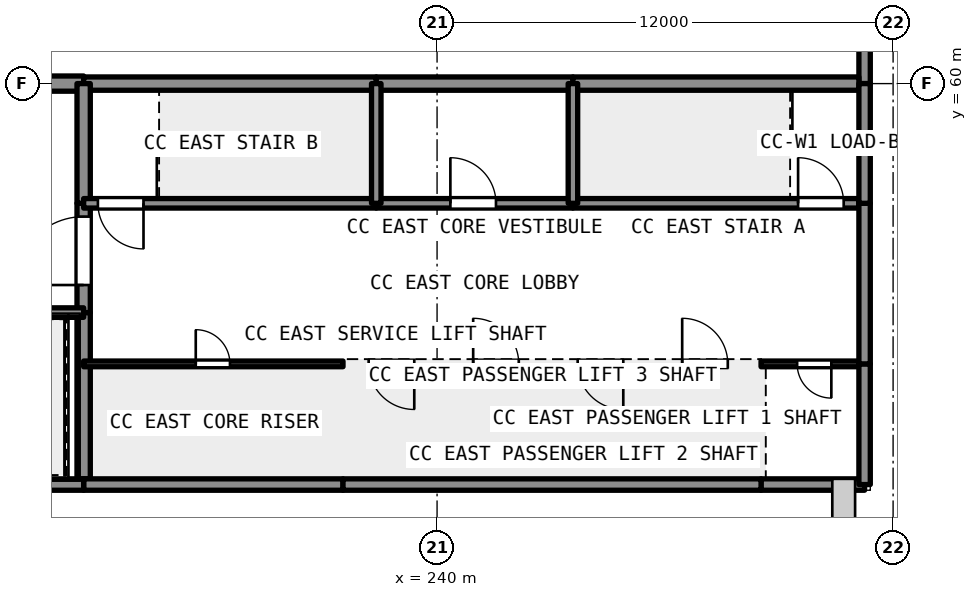
"""IFC4 building model, lengths in metres.
Left out: names, types, materials, properties, quantities, classifications, styles, units other than length and angle.
Written with IfcOpenShell. Run it as: python <this file> out.ifc"""

import sys

from ifc_helpers import new_model, si_unit, direction, frame, frame_2d, origin, place, context, subcontext, project, spatial, rectangle, extrude, element, fill, save


model = new_model("IFC4")
c1 = context("Model", 3, precision=1e-05, world=origin(), true_north=direction((0.0, 1.0)))
c2 = subcontext(c1, "Body", "Model", "MODEL_VIEW")
j1 = project(units=[si_unit("LENGTHUNIT", "METRE"), si_unit("PLANEANGLEUNIT", "RADIAN")], contexts=[c1])
p1 = place(None, origin())
s1 = spatial("IfcSite", under=j1, at=p1, CompositionType="ELEMENT")
p2 = place(p1, origin())
s2 = spatial("IfcBuilding", under=s1, at=p2, CompositionType="ELEMENT")
p3 = place(p2, frame((0.0, 0.0, 20.4)))
s3 = spatial("IfcBuildingStorey", under=s2, at=p3, CompositionType="ELEMENT", Elevation=20.4)
p4 = place(p3, frame((221.1, 60.0, 0.0), z_axis=(0.0, 0.0, 1.0), x_axis=(1.0, 0.0, 0.0)))
e1 = element("IfcWall", 1, at=p4, inside=s3, PredefinedType="SHEAR", context=c2, shape_type="SweptSolid", body=[
    extrude(rectangle(XDim=9.6, YDim=0.4, at=frame_2d((4.8, 0.0))), origin(), (0.0, 0.0, 1.0), 4.59),
])
p5 = place(p3, frame((251.25, 60.0, 0.0), z_axis=(0.0, 0.0, 1.0), x_axis=(0.0, 1.0, 0.0)))
e2 = element("IfcWall", 2, at=p5, inside=s3, PredefinedType="SOLIDWALL", context=c2, shape_type="SweptSolid", body=[
    extrude(rectangle(XDim=50.55, YDim=0.3, at=frame_2d((25.275, 0.0))), origin(), (0.0, 0.0, 1.0), 4.59),
])
p6 = place(p3, frame((230.7, 60.0, 0.0), z_axis=(0.0, 0.0, 1.0), x_axis=(1.0, 0.0, 0.0)))
e3 = element("IfcWall", 3, at=p6, inside=s3, PredefinedType="SHEAR", context=c2, shape_type="SweptSolid", body=[
    extrude(rectangle(XDim=7.7, YDim=0.35, at=frame_2d((3.85, 0.0))), origin(), (0.0, 0.0, 1.0), 4.59),
])
p7 = place(p3, frame((238.4, 60.0, 0.0), z_axis=(0.0, 0.0, 1.0), x_axis=(1.0, 0.0, 0.0)))
e4 = element("IfcWall", 4, at=p7, inside=s3, PredefinedType="SHEAR", context=c2, shape_type="SweptSolid", body=[
    extrude(rectangle(XDim=5.175, YDim=0.35, at=frame_2d((2.587, 0.0))), origin(), (0.0, 0.0, 1.0), 4.59),
])
p8 = place(p3, frame((243.575, 60.0, 0.0), z_axis=(0.0, 0.0, 1.0), x_axis=(1.0, 0.0, 0.0)))
e5 = element("IfcWall", 5, at=p8, inside=s3, PredefinedType="SHEAR", context=c2, shape_type="SweptSolid", body=[
    extrude(rectangle(XDim=7.525, YDim=0.35, at=frame_2d((3.763, 0.0))), origin(), (0.0, 0.0, 1.0), 4.59),
])
p9 = place(p3, frame((230.7, 49.6, 0.0), z_axis=(0.0, 0.0, 1.0), x_axis=(0.0, 1.0, 0.0)))
e6 = element("IfcWall", 6, at=p9, inside=s3, PredefinedType="SHEAR", context=c2, shape_type="SweptSolid", body=[
    extrude(rectangle(XDim=4.375, YDim=0.35, at=frame_2d((2.188, 0.0))), origin(), (0.0, 0.0, 1.0), 4.59),
])
p10 = place(p3, frame((230.7, 53.975, 0.0), z_axis=(0.0, 0.0, 1.0), x_axis=(0.0, 1.0, 0.0)))
e7 = element("IfcWall", 7, at=p10, inside=s3, PredefinedType="SHEAR", context=c2, shape_type="SweptSolid", body=[
    extrude(rectangle(XDim=2.875, YDim=0.35, at=frame_2d((1.438, 0.0))), origin(), (0.0, 0.0, 1.0), 4.59),
])
p11 = place(p10, frame((0.725, 0.0, 0.0)))
e8 = element("IfcOpeningElement", 8, at=p11, cuts=e7, PredefinedType="OPENING", context=c2, shape_type="SweptSolid", body=[
    extrude(rectangle(XDim=1.8, YDim=2.1, at=frame_2d((0.9, 1.05))), frame((0.0, 0.186, 0.0), z_axis=(0.0, -1.0, 0.0), x_axis=(1.0, 0.0, 0.0)), (0.0, 0.0, 1.0), 0.371),
])
p12 = place(p3, frame((230.7, 56.85, 0.0), z_axis=(0.0, 0.0, 1.0), x_axis=(0.0, 1.0, 0.0)))
e9 = element("IfcWall", 9, at=p12, inside=s3, PredefinedType="SHEAR", context=c2, shape_type="SweptSolid", body=[
    extrude(rectangle(XDim=3.15, YDim=0.35, at=frame_2d((1.575, 0.0))), origin(), (0.0, 0.0, 1.0), 4.59),
])
p13 = place(p3, frame((238.4, 56.85, 0.0), z_axis=(0.0, 0.0, 1.0), x_axis=(-1.0, 0.0, 0.0)))
e10 = element("IfcWall", 10, at=p13, inside=s3, PredefinedType="SHEAR", context=c2, shape_type="SweptSolid", body=[
    extrude(rectangle(XDim=7.7, YDim=0.25, at=frame_2d((3.85, 0.0))), origin(), (0.0, 0.0, 1.0), 4.59),
])
p14 = place(p13, frame((6.125, 0.0, 0.0)))
e11 = element("IfcOpeningElement", 11, at=p14, cuts=e10, PredefinedType="OPENING", context=c2, shape_type="SweptSolid", body=[
    extrude(rectangle(XDim=1.2, YDim=2.1, at=frame_2d((0.6, 1.05))), frame((0.0, 0.135, 0.0), z_axis=(0.0, -1.0, 0.0), x_axis=(1.0, 0.0, 0.0)), (0.0, 0.0, 1.0), 0.271),
])
p15 = place(p3, frame((243.575, 56.85, 0.0), z_axis=(0.0, 0.0, 1.0), x_axis=(-1.0, 0.0, 0.0)))
e12 = element("IfcWall", 12, at=p15, inside=s3, PredefinedType="SHEAR", context=c2, shape_type="SweptSolid", body=[
    extrude(rectangle(XDim=5.175, YDim=0.25, at=frame_2d((2.587, 0.0))), origin(), (0.0, 0.0, 1.0), 4.59),
])
p16 = place(p15, frame((2.025, 0.0, 0.0)))
e13 = element("IfcOpeningElement", 13, at=p16, cuts=e12, PredefinedType="OPENING", context=c2, shape_type="SweptSolid", body=[
    extrude(rectangle(XDim=1.2, YDim=2.1, at=frame_2d((0.6, 1.05))), frame((0.0, 0.135, 0.0), z_axis=(0.0, -1.0, 0.0), x_axis=(1.0, 0.0, 0.0)), (0.0, 0.0, 1.0), 0.271),
])
p17 = place(p3, frame((251.1, 56.85, 0.0), z_axis=(0.0, 0.0, 1.0), x_axis=(-1.0, 0.0, 0.0)))
e14 = element("IfcWall", 14, at=p17, inside=s3, PredefinedType="SHEAR", context=c2, shape_type="SweptSolid", body=[
    extrude(rectangle(XDim=7.525, YDim=0.25, at=frame_2d((3.763, 0.0))), origin(), (0.0, 0.0, 1.0), 4.59),
])
p18 = place(p17, frame((0.4, 0.0, 0.0)))
e15 = element("IfcOpeningElement", 15, at=p18, cuts=e14, PredefinedType="OPENING", context=c2, shape_type="SweptSolid", body=[
    extrude(rectangle(XDim=1.2, YDim=2.1, at=frame_2d((0.6, 1.05))), frame((0.0, 0.135, 0.0), z_axis=(0.0, -1.0, 0.0), x_axis=(1.0, 0.0, 0.0)), (0.0, 0.0, 1.0), 0.271),
])
for number, where, z_axis, x_axis in (
    (16, (243.575, 56.85, 0.0), (0.0, 0.0, 1.0), (0.0, 1.0, 0.0)),
    (17, (238.4, 56.85, 0.0), (0.0, 0.0, 1.0), (0.0, 1.0, 0.0)),
):
    element("IfcWall", number, at=place(p3, frame(where, z_axis=z_axis, x_axis=x_axis)), inside=s3, PredefinedType="SHEAR", context=c2, shape_type="SweptSolid", body=[
        extrude(rectangle(XDim=3.15, YDim=0.25, at=frame_2d((1.575, 0.0))), origin(), (0.0, 0.0, 1.0), 4.59),
    ])
p19 = place(p2, origin())
s4 = spatial("IfcBuildingStorey", under=s2, at=p19, CompositionType="ELEMENT", Elevation=0.0)
for number, where, z_axis, x_axis in (
    (18, (248.525, 49.6, -1.2), (0.0, 0.0, 1.0), (0.0, 1.0, 0.0)),
    (19, (245.775, 49.6, -1.2), (0.0, 0.0, 1.0), (0.0, 1.0, 0.0)),
    (20, (243.025, 49.6, -1.2), (0.0, 0.0, 1.0), (0.0, 1.0, 0.0)),
    (21, (240.275, 49.6, -1.2), (0.0, 0.0, 1.0), (0.0, 1.0, 0.0)),
    (22, (237.525, 49.6, -1.2), (0.0, 0.0, 1.0), (0.0, 1.0, 0.0)),
):
    element("IfcWall", number, at=place(p19, frame(where, z_axis=z_axis, x_axis=x_axis)), inside=s4, PredefinedType="SHEAR", context=c2, shape_type="SweptSolid", body=[
        extrude(rectangle(XDim=3.025, YDim=0.25, at=frame_2d((1.512, 0.0))), origin(), (0.0, 0.0, 1.0), 26.19),
    ])
p20 = place(p19, frame((237.525, 52.625, -1.2), z_axis=(0.0, 0.0, 1.0), x_axis=(1.0, 0.0, 0.0)))
e23 = element("IfcWall", 23, at=p20, inside=s4, PredefinedType="SHEAR", context=c2, shape_type="SweptSolid", body=[
    extrude(rectangle(XDim=11.0, YDim=0.25, at=frame_2d((5.5, 0.0))), origin(), (0.0, 0.0, 1.0), 26.19),
])
p21 = place(p20, frame((8.925, 0.0, 1.2)))
e24 = element("IfcOpeningElement", 24, at=p21, cuts=e23, PredefinedType="OPENING", context=c2, shape_type="SweptSolid", body=[
    extrude(rectangle(XDim=1.2, YDim=2.1, at=frame_2d((0.6, 1.05))), frame((0.0, 0.135, 0.0), z_axis=(0.0, -1.0, 0.0), x_axis=(1.0, 0.0, 0.0)), (0.0, 0.0, 1.0), 0.271),
])
p22 = place(p20, frame((6.175, 0.0, 1.2)))
e25 = element("IfcOpeningElement", 25, at=p22, cuts=e23, PredefinedType="OPENING", context=c2, shape_type="SweptSolid", body=[
    extrude(rectangle(XDim=1.2, YDim=2.1, at=frame_2d((0.6, 1.05))), frame((0.0, 0.135, 0.0), z_axis=(0.0, -1.0, 0.0), x_axis=(1.0, 0.0, 0.0)), (0.0, 0.0, 1.0), 0.271),
])
p23 = place(p20, frame((3.425, 0.0, 1.2)))
e26 = element("IfcOpeningElement", 26, at=p23, cuts=e23, PredefinedType="OPENING", context=c2, shape_type="SweptSolid", body=[
    extrude(rectangle(XDim=1.2, YDim=2.1, at=frame_2d((0.6, 1.05))), frame((0.0, 0.135, 0.0), z_axis=(0.0, -1.0, 0.0), x_axis=(1.0, 0.0, 0.0)), (0.0, 0.0, 1.0), 0.271),
])
p24 = place(p20, frame((0.675, 0.0, 1.2)))
e27 = element("IfcOpeningElement", 27, at=p24, cuts=e23, PredefinedType="OPENING", context=c2, shape_type="SweptSolid", body=[
    extrude(rectangle(XDim=1.2, YDim=2.1, at=frame_2d((0.6, 1.05))), frame((0.0, 0.135, 0.0), z_axis=(0.0, -1.0, 0.0), x_axis=(1.0, 0.0, 0.0)), (0.0, 0.0, 1.0), 0.271),
])
p25 = place(p20, frame((8.925, 0.0, 10.2)))
e28 = element("IfcOpeningElement", 28, at=p25, cuts=e23, PredefinedType="OPENING", context=c2, shape_type="SweptSolid", body=[
    extrude(rectangle(XDim=1.2, YDim=2.1, at=frame_2d((0.6, 1.05))), frame((0.0, 0.135, 0.0), z_axis=(0.0, -1.0, 0.0), x_axis=(1.0, 0.0, 0.0)), (0.0, 0.0, 1.0), 0.271),
])
p26 = place(p20, frame((6.175, 0.0, 10.2)))
e29 = element("IfcOpeningElement", 29, at=p26, cuts=e23, PredefinedType="OPENING", context=c2, shape_type="SweptSolid", body=[
    extrude(rectangle(XDim=1.2, YDim=2.1, at=frame_2d((0.6, 1.05))), frame((0.0, 0.135, 0.0), z_axis=(0.0, -1.0, 0.0), x_axis=(1.0, 0.0, 0.0)), (0.0, 0.0, 1.0), 0.271),
])
p27 = place(p20, frame((3.425, 0.0, 10.2)))
e30 = element("IfcOpeningElement", 30, at=p27, cuts=e23, PredefinedType="OPENING", context=c2, shape_type="SweptSolid", body=[
    extrude(rectangle(XDim=1.2, YDim=2.1, at=frame_2d((0.6, 1.05))), frame((0.0, 0.135, 0.0), z_axis=(0.0, -1.0, 0.0), x_axis=(1.0, 0.0, 0.0)), (0.0, 0.0, 1.0), 0.271),
])
p28 = place(p20, frame((0.675, 0.0, 10.2)))
e31 = element("IfcOpeningElement", 31, at=p28, cuts=e23, PredefinedType="OPENING", context=c2, shape_type="SweptSolid", body=[
    extrude(rectangle(XDim=1.2, YDim=2.1, at=frame_2d((0.6, 1.05))), frame((0.0, 0.135, 0.0), z_axis=(0.0, -1.0, 0.0), x_axis=(1.0, 0.0, 0.0)), (0.0, 0.0, 1.0), 0.271),
])
p29 = place(p20, frame((8.925, 0.0, 16.2)))
e32 = element("IfcOpeningElement", 32, at=p29, cuts=e23, PredefinedType="OPENING", context=c2, shape_type="SweptSolid", body=[
    extrude(rectangle(XDim=1.2, YDim=2.1, at=frame_2d((0.6, 1.05))), frame((0.0, 0.135, 0.0), z_axis=(0.0, -1.0, 0.0), x_axis=(1.0, 0.0, 0.0)), (0.0, 0.0, 1.0), 0.271),
])
p30 = place(p20, frame((6.175, 0.0, 16.2)))
e33 = element("IfcOpeningElement", 33, at=p30, cuts=e23, PredefinedType="OPENING", context=c2, shape_type="SweptSolid", body=[
    extrude(rectangle(XDim=1.2, YDim=2.1, at=frame_2d((0.6, 1.05))), frame((0.0, 0.135, 0.0), z_axis=(0.0, -1.0, 0.0), x_axis=(1.0, 0.0, 0.0)), (0.0, 0.0, 1.0), 0.271),
])
p31 = place(p20, frame((3.425, 0.0, 16.2)))
e34 = element("IfcOpeningElement", 34, at=p31, cuts=e23, PredefinedType="OPENING", context=c2, shape_type="SweptSolid", body=[
    extrude(rectangle(XDim=1.2, YDim=2.1, at=frame_2d((0.6, 1.05))), frame((0.0, 0.135, 0.0), z_axis=(0.0, -1.0, 0.0), x_axis=(1.0, 0.0, 0.0)), (0.0, 0.0, 1.0), 0.271),
])
p32 = place(p20, frame((0.675, 0.0, 16.2)))
e35 = element("IfcOpeningElement", 35, at=p32, cuts=e23, PredefinedType="OPENING", context=c2, shape_type="SweptSolid", body=[
    extrude(rectangle(XDim=1.2, YDim=2.1, at=frame_2d((0.6, 1.05))), frame((0.0, 0.135, 0.0), z_axis=(0.0, -1.0, 0.0), x_axis=(1.0, 0.0, 0.0)), (0.0, 0.0, 1.0), 0.271),
])
p33 = place(p20, frame((8.925, 0.0, 21.6)))
e36 = element("IfcOpeningElement", 36, at=p33, cuts=e23, PredefinedType="OPENING", context=c2, shape_type="SweptSolid", body=[
    extrude(rectangle(XDim=1.2, YDim=2.1, at=frame_2d((0.6, 1.05))), frame((0.0, 0.135, 0.0), z_axis=(0.0, -1.0, 0.0), x_axis=(1.0, 0.0, 0.0)), (0.0, 0.0, 1.0), 0.271),
])
p34 = place(p20, frame((6.175, 0.0, 21.6)))
e37 = element("IfcOpeningElement", 37, at=p34, cuts=e23, PredefinedType="OPENING", context=c2, shape_type="SweptSolid", body=[
    extrude(rectangle(XDim=1.2, YDim=2.1, at=frame_2d((0.6, 1.05))), frame((0.0, 0.135, 0.0), z_axis=(0.0, -1.0, 0.0), x_axis=(1.0, 0.0, 0.0)), (0.0, 0.0, 1.0), 0.271),
])
p35 = place(p20, frame((3.425, 0.0, 21.6)))
e38 = element("IfcOpeningElement", 38, at=p35, cuts=e23, PredefinedType="OPENING", context=c2, shape_type="SweptSolid", body=[
    extrude(rectangle(XDim=1.2, YDim=2.1, at=frame_2d((0.6, 1.05))), frame((0.0, 0.135, 0.0), z_axis=(0.0, -1.0, 0.0), x_axis=(1.0, 0.0, 0.0)), (0.0, 0.0, 1.0), 0.271),
])
p36 = place(p20, frame((0.675, 0.0, 21.6)))
e39 = element("IfcOpeningElement", 39, at=p36, cuts=e23, PredefinedType="OPENING", context=c2, shape_type="SweptSolid", body=[
    extrude(rectangle(XDim=1.2, YDim=2.1, at=frame_2d((0.6, 1.05))), frame((0.0, 0.135, 0.0), z_axis=(0.0, -1.0, 0.0), x_axis=(1.0, 0.0, 0.0)), (0.0, 0.0, 1.0), 0.271),
])
p37 = place(p19, frame((237.525, 49.725, -1.2), z_axis=(0.0, 0.0, 1.0), x_axis=(1.0, 0.0, 0.0)))
e40 = element("IfcWall", 40, at=p37, inside=s4, PredefinedType="SHEAR", context=c2, shape_type="SweptSolid", body=[
    extrude(rectangle(XDim=11.0, YDim=0.25, at=frame_2d((5.5, 0.0))), origin(), (0.0, 0.0, 1.0), 26.19),
])
p38 = place(p3, frame((248.525, 49.45, 0.0), z_axis=(0.0, 0.0, 1.0), x_axis=(1.0, 0.0, 0.0)))
e41 = element("IfcWall", 41, at=p38, inside=s3, PredefinedType="SOLIDWALL", context=c2, shape_type="SweptSolid", body=[
    extrude(rectangle(XDim=2.725, YDim=0.3, at=frame_2d((1.363, 0.0))), origin(), (0.0, 0.0, 1.0), 4.59),
])
p39 = place(p3, frame((251.1, 52.625, 0.0), z_axis=(0.0, 0.0, 1.0), x_axis=(-1.0, 0.0, 0.0)))
e42 = element("IfcWall", 42, at=p39, inside=s3, PredefinedType="PARTITIONING", context=c2, shape_type="SweptSolid", body=[
    extrude(rectangle(XDim=2.575, YDim=0.15, at=frame_2d((1.288, 0.0))), origin(), (0.0, 0.0, 1.0), 4.59),
])
p40 = place(p39, frame((0.725, 0.0, 0.0)))
e43 = element("IfcOpeningElement", 43, at=p40, cuts=e42, PredefinedType="OPENING", context=c2, shape_type="SweptSolid", body=[
    extrude(rectangle(XDim=0.9, YDim=2.1, at=frame_2d((0.45, 1.05))), frame((0.0, 0.085, 0.0), z_axis=(0.0, -1.0, 0.0), x_axis=(1.0, 0.0, 0.0)), (0.0, 0.0, 1.0), 0.171),
])
p41 = place(p3, frame((251.25, 49.45, 0.0), z_axis=(0.0, 0.0, 1.0), x_axis=(0.0, 1.0, 0.0)))
e44 = element("IfcWall", 44, at=p41, inside=s3, PredefinedType="SOLIDWALL", context=c2, shape_type="SweptSolid", body=[
    extrude(rectangle(XDim=3.175, YDim=0.3, at=frame_2d((1.587, 0.0))), origin(), (0.0, 0.0, 1.0), 4.59),
])
p42 = place(p3, frame((230.7, 49.45, 0.0), z_axis=(0.0, 0.0, 1.0), x_axis=(1.0, 0.0, 0.0)))
e45 = element("IfcWall", 45, at=p42, inside=s3, PredefinedType="SOLIDWALL", context=c2, shape_type="SweptSolid", body=[
    extrude(rectangle(XDim=6.825, YDim=0.3, at=frame_2d((3.413, 0.0))), origin(), (0.0, 0.0, 1.0), 4.59),
])
p43 = place(p3, frame((237.525, 52.625, 0.0), z_axis=(0.0, 0.0, 1.0), x_axis=(-1.0, 0.0, 0.0)))
e46 = element("IfcWall", 46, at=p43, inside=s3, PredefinedType="PARTITIONING", context=c2, shape_type="SweptSolid", body=[
    extrude(rectangle(XDim=6.825, YDim=0.15, at=frame_2d((3.413, 0.0))), origin(), (0.0, 0.0, 1.0), 4.59),
])
p44 = place(p43, frame((2.975, 0.0, 0.0)))
e47 = element("IfcOpeningElement", 47, at=p44, cuts=e46, PredefinedType="OPENING", context=c2, shape_type="SweptSolid", body=[
    extrude(rectangle(XDim=0.9, YDim=2.1, at=frame_2d((0.45, 1.05))), frame((0.0, 0.085, 0.0), z_axis=(0.0, -1.0, 0.0), x_axis=(1.0, 0.0, 0.0)), (0.0, 0.0, 1.0), 0.171),
])
p45 = place(p3, frame((221.275, 49.45, 0.0), z_axis=(0.0, 0.0, 1.0), x_axis=(1.0, 0.0, 0.0)))
e48 = element("IfcWall", 48, at=p45, inside=s3, PredefinedType="SOLIDWALL", context=c2, shape_type="SweptSolid", body=[
    extrude(rectangle(XDim=9.425, YDim=0.3, at=frame_2d((4.712, 0.0))), origin(), (0.0, 0.0, 1.0), 4.59),
])
p46 = place(p3, frame((237.525, 49.45, 0.0), z_axis=(0.0, 0.0, 1.0), x_axis=(1.0, 0.0, 0.0)))
e49 = element("IfcWall", 49, at=p46, inside=s3, PredefinedType="SOLIDWALL", context=c2, shape_type="SweptSolid", body=[
    extrude(rectangle(XDim=11.0, YDim=0.3, at=frame_2d((5.5, 0.0))), origin(), (0.0, 0.0, 1.0), 4.59),
])
p47 = place(p3, frame((251.25, 52.625, 0.0), z_axis=(0.0, 0.0, 1.0), x_axis=(0.0, 1.0, 0.0)))
e50 = element("IfcWall", 50, at=p47, inside=s3, PredefinedType="SOLIDWALL", context=c2, shape_type="SweptSolid", body=[
    extrude(rectangle(XDim=4.225, YDim=0.3, at=frame_2d((2.113, 0.0))), origin(), (0.0, 0.0, 1.0), 4.59),
])
p48 = place(p3, frame((251.25, 56.85, 0.0), z_axis=(0.0, 0.0, 1.0), x_axis=(0.0, 1.0, 0.0)))
e51 = element("IfcWall", 51, at=p48, inside=s3, PredefinedType="SOLIDWALL", context=c2, shape_type="SweptSolid", body=[
    extrude(rectangle(XDim=3.15, YDim=0.3, at=frame_2d((1.575, 0.0))), origin(), (0.0, 0.0, 1.0), 4.59),
])
p49 = place(p3, frame((221.275, 53.975, 0.0), z_axis=(0.0, 0.0, 1.0), x_axis=(1.0, 0.0, 0.0)))
e52 = element("IfcWall", 52, at=p49, inside=s3, PredefinedType="SHEAR", context=c2, shape_type="SweptSolid", body=[
    extrude(rectangle(XDim=9.425, YDim=0.25, at=frame_2d((4.712, 0.0))), origin(), (0.0, 0.0, 1.0), 4.59),
])
p50 = place(p49, frame((0.425, 0.0, 0.0)))
e53 = element("IfcOpeningElement", 53, at=p50, cuts=e52, PredefinedType="OPENING", context=c2, shape_type="SweptSolid", body=[
    extrude(rectangle(XDim=2.4, YDim=2.1, at=frame_2d((1.2, 1.05))), frame((0.0, 0.135, 0.0), z_axis=(0.0, -1.0, 0.0), x_axis=(1.0, 0.0, 0.0)), (0.0, 0.0, 1.0), 0.271),
])
p51 = place(p11, origin())
e54 = element("IfcDoor", 54, at=p51, inside=s3, OperationType="DOUBLE_DOOR_SINGLE_SWING", PredefinedType="DOOR", context=c2, shape_type="SweptSolid", body=[
    extrude(rectangle(XDim=1.8, YDim=2.1, at=frame_2d((0.9, 1.05))), frame((0.0, 0.025, 0.0), z_axis=(0.0, -1.0, 0.0), x_axis=(1.0, 0.0, 0.0)), (0.0, 0.0, 1.0), 0.05),
])
fill(e8, e54)
p52 = place(p18, origin())
e55 = element("IfcDoor", 55, at=p52, inside=s3, OperationType="SINGLE_SWING_RIGHT", PredefinedType="DOOR", context=c2, shape_type="SweptSolid", body=[
    extrude(rectangle(XDim=1.2, YDim=2.1, at=frame_2d((0.6, 1.05))), frame((0.0, 0.025, 0.0), z_axis=(0.0, -1.0, 0.0), x_axis=(1.0, 0.0, 0.0)), (0.0, 0.0, 1.0), 0.05),
])
fill(e15, e55)
p53 = place(p14, origin())
e56 = element("IfcDoor", 56, at=p53, inside=s3, OperationType="SINGLE_SWING_LEFT", PredefinedType="DOOR", context=c2, shape_type="SweptSolid", body=[
    extrude(rectangle(XDim=1.2, YDim=2.1, at=frame_2d((0.6, 1.05))), frame((0.0, 0.025, 0.0), z_axis=(0.0, -1.0, 0.0), x_axis=(1.0, 0.0, 0.0)), (0.0, 0.0, 1.0), 0.05),
])
fill(e11, e56)
p54 = place(p16, origin())
e57 = element("IfcDoor", 57, at=p54, inside=s3, OperationType="SINGLE_SWING_RIGHT", PredefinedType="DOOR", context=c2, shape_type="SweptSolid", body=[
    extrude(rectangle(XDim=1.2, YDim=2.1, at=frame_2d((0.6, 1.05))), frame((0.0, 0.025, 0.0), z_axis=(0.0, -1.0, 0.0), x_axis=(1.0, 0.0, 0.0)), (0.0, 0.0, 1.0), 0.05),
])
fill(e13, e57)
p55 = place(p33, origin())
e58 = element("IfcDoor", 58, at=p55, inside=s3, OperationType="SLIDING_TO_LEFT", PredefinedType="DOOR", context=c2, shape_type="SweptSolid", body=[
    extrude(rectangle(XDim=1.2, YDim=2.1, at=frame_2d((0.6, 1.05))), frame((0.0, 0.025, 0.0), z_axis=(0.0, -1.0, 0.0), x_axis=(1.0, 0.0, 0.0)), (0.0, 0.0, 1.0), 0.05),
])
fill(e36, e58)
p56 = place(p34, origin())
e59 = element("IfcDoor", 59, at=p56, inside=s3, OperationType="SLIDING_TO_RIGHT", PredefinedType="DOOR", context=c2, shape_type="SweptSolid", body=[
    extrude(rectangle(XDim=1.2, YDim=2.1, at=frame_2d((0.6, 1.05))), frame((0.0, 0.025, 0.0), z_axis=(0.0, -1.0, 0.0), x_axis=(1.0, 0.0, 0.0)), (0.0, 0.0, 1.0), 0.05),
])
fill(e37, e59)
p57 = place(p35, origin())
e60 = element("IfcDoor", 60, at=p57, inside=s3, OperationType="SLIDING_TO_LEFT", PredefinedType="DOOR", context=c2, shape_type="SweptSolid", body=[
    extrude(rectangle(XDim=1.2, YDim=2.1, at=frame_2d((0.6, 1.05))), frame((0.0, 0.025, 0.0), z_axis=(0.0, -1.0, 0.0), x_axis=(1.0, 0.0, 0.0)), (0.0, 0.0, 1.0), 0.05),
])
fill(e38, e60)
p58 = place(p36, origin())
e61 = element("IfcDoor", 61, at=p58, inside=s3, OperationType="SLIDING_TO_RIGHT", PredefinedType="DOOR", context=c2, shape_type="SweptSolid", body=[
    extrude(rectangle(XDim=1.2, YDim=2.1, at=frame_2d((0.6, 1.05))), frame((0.0, 0.025, 0.0), z_axis=(0.0, -1.0, 0.0), x_axis=(1.0, 0.0, 0.0)), (0.0, 0.0, 1.0), 0.05),
])
fill(e39, e61)
p59 = place(p40, origin())
e62 = element("IfcDoor", 62, at=p59, inside=s3, OperationType="SINGLE_SWING_LEFT", PredefinedType="DOOR", context=c2, shape_type="SweptSolid", body=[
    extrude(rectangle(XDim=0.9, YDim=2.1, at=frame_2d((0.45, 1.05))), frame((0.0, 0.025, 0.0), z_axis=(0.0, -1.0, 0.0), x_axis=(1.0, 0.0, 0.0)), (0.0, 0.0, 1.0), 0.05),
])
fill(e43, e62)
p60 = place(p44, origin())
e63 = element("IfcDoor", 63, at=p60, inside=s3, OperationType="SINGLE_SWING_RIGHT", PredefinedType="DOOR", context=c2, shape_type="SweptSolid", body=[
    extrude(rectangle(XDim=0.9, YDim=2.1, at=frame_2d((0.45, 1.05))), frame((0.0, 0.025, 0.0), z_axis=(0.0, -1.0, 0.0), x_axis=(1.0, 0.0, 0.0)), (0.0, 0.0, 1.0), 0.05),
])
fill(e47, e63)
save(model, sys.argv[1])
